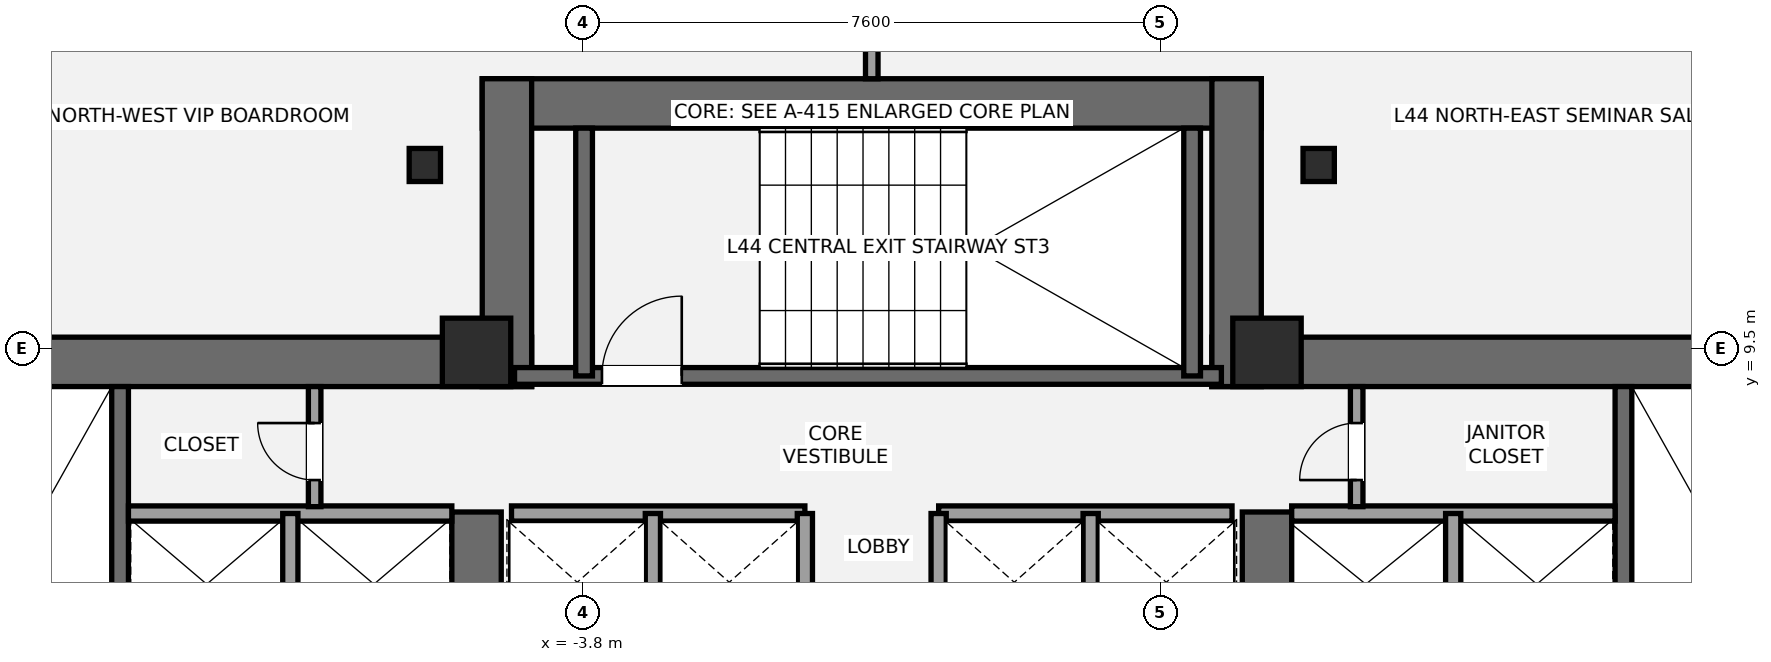
"""IFC4 building model, lengths in metres.
Left out: names, types, materials, properties, quantities, classifications, styles, units other than length and angle.
Written with IfcOpenShell. Run it as: python <this file> out.ifc"""

import sys

from ifc_helpers import new_model, si_unit, direction, frame, frame_2d, origin, origin_2d, place, context, subcontext, project, spatial, rectangle, i_section, extrude, element, fill, save


model = new_model("IFC4")
c1 = context("Model", 3, precision=1e-05, world=origin(), true_north=direction((0.0, 1.0)))
c2 = subcontext(c1, "Body", "Model", "MODEL_VIEW")
j1 = project(units=[si_unit("LENGTHUNIT", "METRE"), si_unit("PLANEANGLEUNIT", "RADIAN")], contexts=[c1])
p1 = place(None, origin())
s1 = spatial("IfcSite", under=j1, at=p1, CompositionType="ELEMENT")
p2 = place(p1, origin())
s2 = spatial("IfcBuilding", under=s1, at=p2, CompositionType="ELEMENT")
p3 = place(p2, frame((0.0, 0.0, 163.0)))
s3 = spatial("IfcBuildingStorey", under=s2, at=p3, CompositionType="ELEMENT", Elevation=163.0)
p4 = place(p3, frame((-13.8, 9.325, 0.0), z_axis=(0.0, 0.0, 1.0), x_axis=(1.0, 0.0, 0.0)))
e1 = element("IfcWall", 1, at=p4, inside=s3, PredefinedType="SHEAR", context=c2, shape_type="SweptSolid", body=[
    extrude(rectangle(XDim=9.325, YDim=0.65, at=frame_2d((4.663, 0.0))), origin(), (0.0, 0.0, 1.0), 3.2),
])
p5 = place(p3, frame((-5.2, 5.35, 0.0), z_axis=(0.0, 0.0, 1.0), x_axis=(0.0, 1.0, 0.0)))
e2 = element("IfcWall", 2, at=p5, inside=s3, PredefinedType="SHEAR", context=c2, shape_type="SweptSolid", body=[
    extrude(rectangle(XDim=2.0, YDim=0.65, at=frame_2d((1.0, 0.0))), origin(), (0.0, 0.0, 1.0), 3.2),
])
p6 = place(p3, frame((-9.89, 1.85, 0.0), z_axis=(0.0, 0.0, 1.0), x_axis=(0.0, 1.0, 0.0)))
e3 = element("IfcWall", 3, at=p6, inside=s3, PredefinedType="SHEAR", context=c2, shape_type="SweptSolid", body=[
    extrude(rectangle(XDim=7.15, YDim=0.22, at=frame_2d((3.575, 0.0))), origin(), (0.0, 0.0, 1.0), 3.2),
])
p7 = place(p3, frame((4.475, 9.325, 0.0), z_axis=(0.0, 0.0, 1.0), x_axis=(1.0, 0.0, 0.0)))
e4 = element("IfcWall", 4, at=p7, inside=s3, PredefinedType="SHEAR", context=c2, shape_type="SweptSolid", body=[
    extrude(rectangle(XDim=9.325, YDim=0.65, at=frame_2d((4.663, 0.0))), origin(), (0.0, 0.0, 1.0), 3.2),
])
p8 = place(p3, frame((5.2, 5.35, 0.0), z_axis=(0.0, 0.0, 1.0), x_axis=(0.0, 1.0, 0.0)))
e5 = element("IfcWall", 5, at=p8, inside=s3, PredefinedType="SHEAR", context=c2, shape_type="SweptSolid", body=[
    extrude(rectangle(XDim=2.0, YDim=0.65, at=frame_2d((1.0, 0.0))), origin(), (0.0, 0.0, 1.0), 3.2),
])
p9 = place(p3, frame((9.89, 1.85, 0.0), z_axis=(0.0, 0.0, 1.0), x_axis=(0.0, 1.0, 0.0)))
e6 = element("IfcWall", 6, at=p9, inside=s3, PredefinedType="SHEAR", context=c2, shape_type="SweptSolid", body=[
    extrude(rectangle(XDim=7.15, YDim=0.22, at=frame_2d((3.575, 0.0))), origin(), (0.0, 0.0, 1.0), 3.2),
])
p10 = place(p3, frame((-5.125, 12.725, 0.0), z_axis=(0.0, 0.0, 1.0), x_axis=(1.0, 0.0, 0.0)))
e7 = element("IfcWall", 7, at=p10, inside=s3, PredefinedType="SHEAR", context=c2, shape_type="SweptSolid", body=[
    extrude(rectangle(XDim=10.25, YDim=0.65, at=frame_2d((5.125, 0.0))), origin(), (0.0, 0.0, 1.0), 3.2),
])
for number, where, z_axis, x_axis in (
    (8, (-4.8, 9.0, 0.0), (0.0, 0.0, 1.0), (0.0, 1.0, 0.0)),
    (9, (4.8, 9.0, 0.0), (0.0, 0.0, 1.0), (0.0, 1.0, 0.0)),
):
    element("IfcWall", number, at=place(p3, frame(where, z_axis=z_axis, x_axis=x_axis)), inside=s3, PredefinedType="SHEAR", context=c2, shape_type="SweptSolid", body=[
        extrude(rectangle(XDim=4.05, YDim=0.65, at=frame_2d((2.025, 0.0))), origin(), (0.0, 0.0, 1.0), 3.2),
    ])
p11 = place(p3, frame((-4.7, 9.14, 0.0), z_axis=(0.0, 0.0, 1.0), x_axis=(1.0, 0.0, 0.0)))
e10 = element("IfcWall", 10, at=p11, inside=s3, PredefinedType="SHEAR", context=c2, shape_type="SweptSolid", body=[
    extrude(rectangle(XDim=9.3, YDim=0.22, at=frame_2d((4.65, 0.0))), origin(), (0.0, 0.0, 1.0), 3.2),
])
p12 = place(p11, frame((1.15, 0.0, 0.0)))
e11 = element("IfcOpeningElement", 11, at=p12, cuts=e10, PredefinedType="OPENING", context=c2, shape_type="SweptSolid", body=[
    extrude(rectangle(XDim=1.05, YDim=2.15, at=frame_2d((0.525, 1.075))), frame((0.0, 0.12, 0.0), z_axis=(0.0, -1.0, 0.0), x_axis=(1.0, 0.0, 0.0)), (0.0, 0.0, 1.0), 0.24),
])
for number, where, z_axis, x_axis in (
    (12, (-3.785, 9.14, 0.0), (0.0, 0.0, 1.0), (0.0, 1.0, 0.0)),
    (13, (4.215, 9.14, 0.0), (0.0, 0.0, 1.0), (0.0, 1.0, 0.0)),
):
    element("IfcWall", number, at=place(p3, frame(where, z_axis=z_axis, x_axis=x_axis)), inside=s3, PredefinedType="SHEAR", context=c2, shape_type="SweptSolid", body=[
        extrude(rectangle(XDim=3.26, YDim=0.22, at=frame_2d((1.63, 0.0))), origin(), (0.0, 0.0, 1.0), 3.2),
    ])
for number, where, z_axis, x_axis in (
    (14, (-5.2, 9.45, 0.0), (0.0, 0.0, 1.0), (1.0, 0.0, 0.0)),
    (15, (5.2, 9.45, 0.0), (0.0, 0.0, 1.0), (1.0, 0.0, 0.0)),
):
    element("IfcColumn", number, at=place(p3, frame(where, z_axis=z_axis, x_axis=x_axis)), inside=s3, PredefinedType="COLUMN", context=c2, shape_type="SweptSolid", body=[
        extrude(rectangle(XDim=0.9, YDim=0.9, at=origin_2d()), origin(), (0.0, 0.0, 1.0), 3.2),
    ])
for number, where, z_axis, x_axis in (
    (16, (5.88, 11.915, 0.0), (0.0, 0.0, 1.0), (1.0, 0.0, 0.0)),
    (17, (-5.88, 11.915, 0.0), (0.0, 0.0, 1.0), (1.0, 0.0, 0.0)),
):
    element("IfcColumn", number, at=place(p3, frame(where, z_axis=z_axis, x_axis=x_axis)), inside=s3, PredefinedType="COLUMN", context=c2, shape_type="SweptSolid", body=[
        extrude(i_section(OverallWidth=0.412, OverallDepth=0.435, WebThickness=0.036, FlangeThickness=0.057, at=origin_2d()), origin(), (0.0, 0.0, 1.0), 3.2),
    ])
p13 = place(p3, frame((-9.78, 7.33, 0.0), z_axis=(0.0, 0.0, 1.0), x_axis=(1.0, 0.0, 0.0)))
e18 = element("IfcWall", 18, at=p13, inside=s3, PredefinedType="SOLIDWALL", context=c2, shape_type="SweptSolid", body=[
    extrude(rectangle(XDim=4.255, YDim=0.2, at=frame_2d((2.127, 0.0))), origin(), (0.0, 0.0, 1.0), 3.02),
])
p14 = place(p3, frame((-7.65, 5.47, 0.0), z_axis=(0.0, 0.0, 1.0), x_axis=(0.0, 1.0, 0.0)))
e19 = element("IfcWall", 19, at=p14, inside=s3, PredefinedType="SOLIDWALL", context=c2, shape_type="SweptSolid", body=[
    extrude(rectangle(XDim=1.86, YDim=0.2, at=frame_2d((0.93, 0.0))), origin(), (0.0, 0.0, 1.0), 3.02),
])
p15 = place(p3, frame((5.525, 7.33, 0.0), z_axis=(0.0, 0.0, 1.0), x_axis=(1.0, 0.0, 0.0)))
e20 = element("IfcWall", 20, at=p15, inside=s3, PredefinedType="SOLIDWALL", context=c2, shape_type="SweptSolid", body=[
    extrude(rectangle(XDim=4.255, YDim=0.2, at=frame_2d((2.127, 0.0))), origin(), (0.0, 0.0, 1.0), 3.02),
])
p16 = place(p3, frame((7.65, 5.47, 0.0), z_axis=(0.0, 0.0, 1.0), x_axis=(0.0, 1.0, 0.0)))
e21 = element("IfcWall", 21, at=p16, inside=s3, PredefinedType="SOLIDWALL", context=c2, shape_type="SweptSolid", body=[
    extrude(rectangle(XDim=1.86, YDim=0.2, at=frame_2d((0.93, 0.0))), origin(), (0.0, 0.0, 1.0), 3.02),
])
for number, where, z_axis, x_axis in (
    (22, (-4.74, 7.33, 0.0), (0.0, 0.0, 1.0), (1.0, 0.0, 0.0)),
    (23, (0.88, 7.33, 0.0), (0.0, 0.0, 1.0), (1.0, 0.0, 0.0)),
):
    element("IfcWall", number, at=place(p3, frame(where, z_axis=z_axis, x_axis=x_axis)), inside=s3, PredefinedType="SOLIDWALL", context=c2, shape_type="SweptSolid", body=[
        extrude(rectangle(XDim=3.86, YDim=0.2, at=frame_2d((1.93, 0.0))), origin(), (0.0, 0.0, 1.0), 3.02),
    ])
for number, where, z_axis, x_axis in (
    (24, (-2.88, 5.52, 0.0), (0.0, 0.0, 1.0), (0.0, 1.0, 0.0)),
    (25, (2.88, 5.52, 0.0), (0.0, 0.0, 1.0), (0.0, 1.0, 0.0)),
    (26, (-0.88, 5.52, 0.0), (0.0, 0.0, 1.0), (0.0, 1.0, 0.0)),
    (27, (0.88, 5.52, 0.0), (0.0, 0.0, 1.0), (0.0, 1.0, 0.0)),
):
    element("IfcWall", number, at=place(p3, frame(where, z_axis=z_axis, x_axis=x_axis)), inside=s3, PredefinedType="SOLIDWALL", context=c2, shape_type="SweptSolid", body=[
        extrude(rectangle(XDim=1.81, YDim=0.2, at=frame_2d((0.905, 0.0))), origin(), (0.0, 0.0, 1.0), 3.02),
    ])
p17 = place(p3, frame((-7.33, 7.42, 0.0), z_axis=(0.0, 0.0, 1.0), x_axis=(0.0, 1.0, 0.0)))
e28 = element("IfcWall", 28, at=p17, inside=s3, PredefinedType="PARTITIONING", context=c2, shape_type="SweptSolid", body=[
    extrude(rectangle(XDim=1.58, YDim=0.165, at=frame_2d((0.79, 0.0))), origin(), (0.0, 0.0, 1.0), 3.02),
])
p18 = place(p17, frame((0.35, 0.0, 0.0)))
e29 = element("IfcOpeningElement", 29, at=p18, cuts=e28, PredefinedType="OPENING", context=c2, shape_type="SweptSolid", body=[
    extrude(rectangle(XDim=0.75, YDim=2.1, at=frame_2d((0.375, 1.05))), frame((0.0, 0.093, 0.0), z_axis=(0.0, -1.0, 0.0), x_axis=(1.0, 0.0, 0.0)), (0.0, 0.0, 1.0), 0.185),
])
p19 = place(p3, frame((6.38, 7.42, 0.0), z_axis=(0.0, 0.0, 1.0), x_axis=(0.0, 1.0, 0.0)))
e30 = element("IfcWall", 30, at=p19, inside=s3, PredefinedType="PARTITIONING", context=c2, shape_type="SweptSolid", body=[
    extrude(rectangle(XDim=1.58, YDim=0.165, at=frame_2d((0.79, 0.0))), origin(), (0.0, 0.0, 1.0), 3.02),
])
p20 = place(p19, frame((0.35, 0.0, 0.0)))
e31 = element("IfcOpeningElement", 31, at=p20, cuts=e30, PredefinedType="OPENING", context=c2, shape_type="SweptSolid", body=[
    extrude(rectangle(XDim=0.75, YDim=2.1, at=frame_2d((0.375, 1.05))), frame((0.0, 0.093, 0.0), z_axis=(0.0, -1.0, 0.0), x_axis=(1.0, 0.0, 0.0)), (0.0, 0.0, 1.0), 0.185),
])
p21 = place(p3, frame((0.0, 13.05, 0.0), z_axis=(0.0, 0.0, 1.0), x_axis=(0.0, 1.0, 0.0)))
e32 = element("IfcWall", 32, at=p21, inside=s3, PredefinedType="PARTITIONING", context=c2, shape_type="SweptSolid", body=[
    extrude(rectangle(XDim=3.29, YDim=0.165, at=frame_2d((1.645, 0.0))), origin(), (0.0, 0.0, 1.0), 3.02),
])
p22 = place(p12, origin())
e33 = element("IfcDoor", 33, at=p22, inside=s3, OperationType="SINGLE_SWING_RIGHT", PredefinedType="DOOR", context=c2, shape_type="SweptSolid", body=[
    extrude(rectangle(XDim=1.05, YDim=2.15, at=frame_2d((0.525, 1.075))), frame((0.0, 0.025, 0.0), z_axis=(0.0, -1.0, 0.0), x_axis=(1.0, 0.0, 0.0)), (0.0, 0.0, 1.0), 0.05),
])
fill(e11, e33)
p23 = place(p18, origin())
e34 = element("IfcDoor", 34, at=p23, inside=s3, OperationType="SINGLE_SWING_RIGHT", PredefinedType="DOOR", context=c2, shape_type="SweptSolid", body=[
    extrude(rectangle(XDim=0.75, YDim=2.1, at=frame_2d((0.375, 1.05))), frame((0.0, 0.025, 0.0), z_axis=(0.0, -1.0, 0.0), x_axis=(1.0, 0.0, 0.0)), (0.0, 0.0, 1.0), 0.05),
])
fill(e29, e34)
p24 = place(p20, origin())
e35 = element("IfcDoor", 35, at=p24, inside=s3, OperationType="SINGLE_SWING_LEFT", PredefinedType="DOOR", context=c2, shape_type="SweptSolid", body=[
    extrude(rectangle(XDim=0.75, YDim=2.1, at=frame_2d((0.375, 1.05))), frame((0.0, 0.025, 0.0), z_axis=(0.0, -1.0, 0.0), x_axis=(1.0, 0.0, 0.0)), (0.0, 0.0, 1.0), 0.05),
])
fill(e31, e35)
save(model, sys.argv[1])
